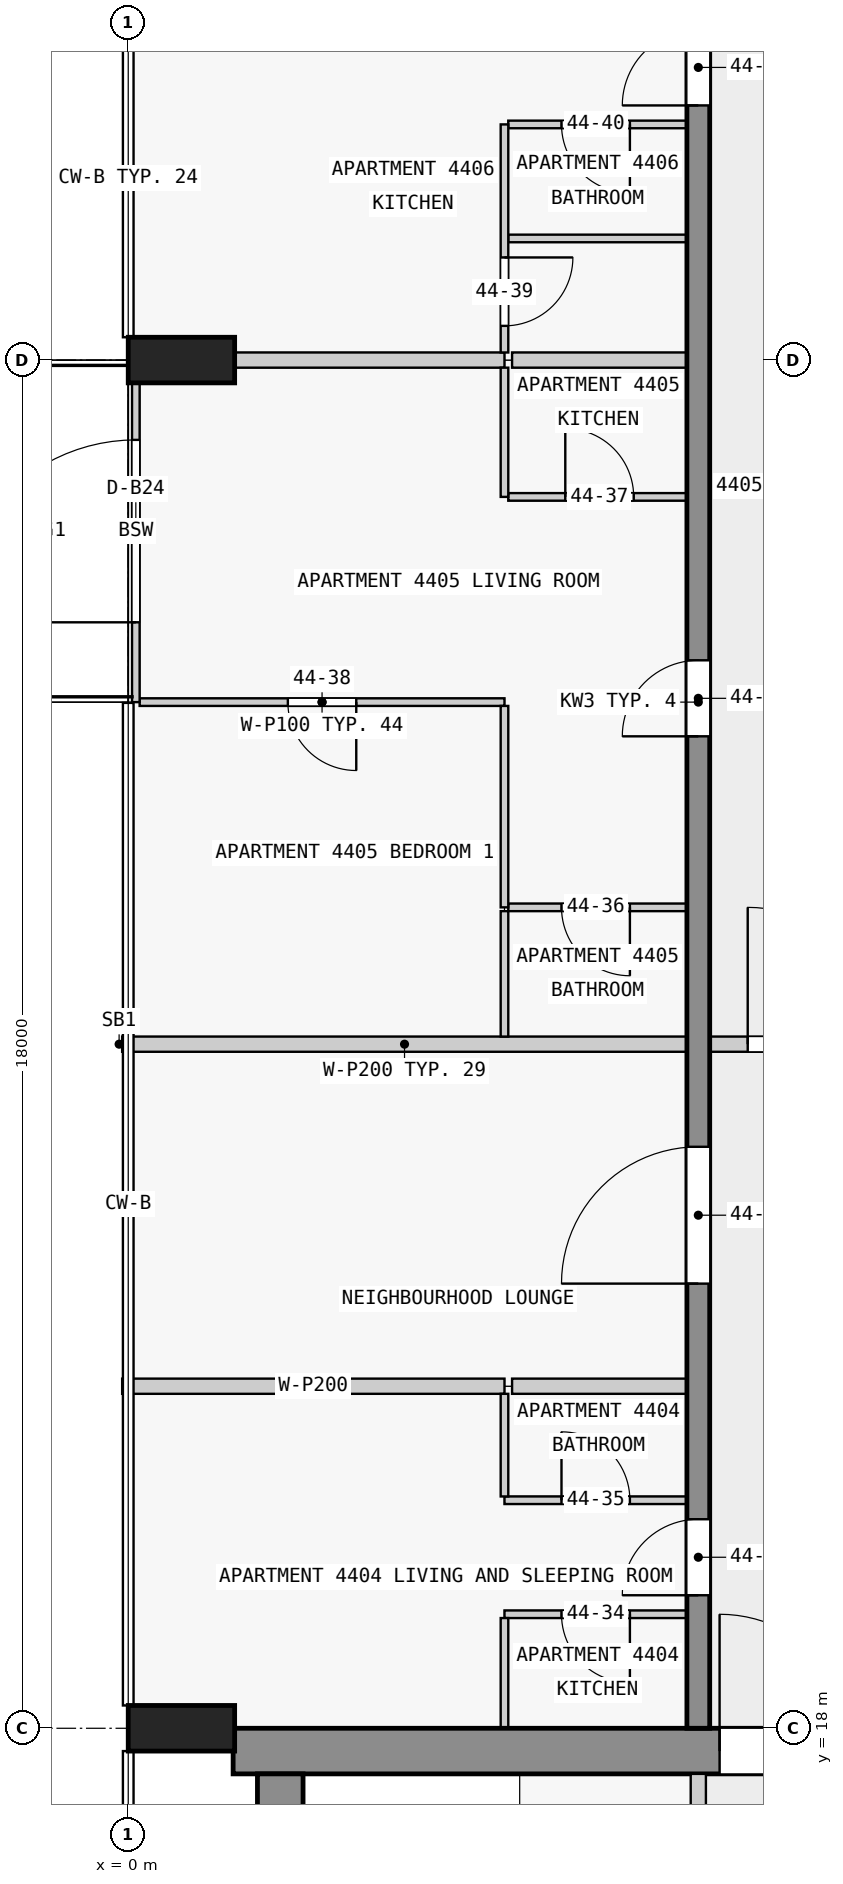
"""IFC4 building model, lengths in metres.
Left out: names, types, materials, properties, quantities, classifications, styles, units other than length and angle.
Written with IfcOpenShell. Run it as: python <this file> out.ifc"""

import sys

from ifc_helpers import new_model, si_unit, direction, frame, frame_2d, origin, origin_2d, place, context, subcontext, project, spatial, rectangle, extrude, element, fill, save


model = new_model("IFC4")
c1 = context("Model", 3, precision=1e-05, world=origin(), true_north=direction((0.0, 1.0)))
c2 = subcontext(c1, "Body", "Model", "MODEL_VIEW")
j1 = project(units=[si_unit("LENGTHUNIT", "METRE"), si_unit("PLANEANGLEUNIT", "RADIAN")], contexts=[c1])
p1 = place(None, origin())
s1 = spatial("IfcSite", under=j1, at=p1, CompositionType="ELEMENT")
p2 = place(p1, origin())
s2 = spatial("IfcBuilding", under=s1, at=p2, CompositionType="ELEMENT")
p3 = place(p2, frame((0.0, 0.0, 170.9)))
s3 = spatial("IfcBuildingStorey", under=s2, at=p3, CompositionType="ELEMENT", Elevation=170.9)
for number, where, z_axis, x_axis in (
    (1, (0.7, 36.0, 0.0), (0.0, 0.0, 1.0), (0.0, 1.0, 0.0)),
    (2, (0.7, 18.0, 0.0), (0.0, 0.0, 1.0), (0.0, 1.0, 0.0)),
):
    element("IfcColumn", number, at=place(p3, frame(where, z_axis=z_axis, x_axis=x_axis)), inside=s3, PredefinedType="COLUMN", context=c2, shape_type="SweptSolid", body=[
        extrude(rectangle(XDim=0.6, YDim=1.4, at=origin_2d()), origin(), (0.0, 0.0, 1.0), 3.5),
    ])
p4 = place(p3, frame((1.38, 17.7, 0.0), z_axis=(0.0, 0.0, 1.0), x_axis=(1.0, 0.0, 0.0)))
e3 = element("IfcWall", 3, at=p4, inside=s3, PredefinedType="SHEAR", context=c2, shape_type="SweptSolid", body=[
    extrude(rectangle(XDim=21.12, YDim=0.6, at=frame_2d((10.56, 0.0))), origin(), (0.0, 0.0, 1.0), 3.25),
])
p5 = place(p4, frame((6.4, 0.0, 0.0)))
e4 = element("IfcOpeningElement", 4, at=p5, cuts=e3, PredefinedType="OPENING", context=c2, shape_type="SweptSolid", body=[
    extrude(rectangle(XDim=1.8, YDim=2.1, at=frame_2d((0.9, 1.05))), frame((0.0, 0.31, 0.0), z_axis=(0.0, -1.0, 0.0), x_axis=(1.0, 0.0, 0.0)), (0.0, 0.0, 1.0), 0.62),
])
p6 = place(p3, frame((2.0, 2.5, 0.0), z_axis=(0.0, 0.0, 1.0), x_axis=(0.0, 1.0, 0.0)))
e5 = element("IfcWall", 5, at=p6, inside=s3, PredefinedType="SHEAR", context=c2, shape_type="SweptSolid", body=[
    extrude(rectangle(XDim=14.9, YDim=0.6, at=frame_2d((7.45, 0.0))), origin(), (0.0, 0.0, 1.0), 3.25),
])
p7 = place(p3, frame((7.5, 18.0, 0.0), z_axis=(0.0, 0.0, 1.0), x_axis=(0.0, 1.0, 0.0)))
e6 = element("IfcWall", 6, at=p7, inside=s3, PredefinedType="SHEAR", context=c2, shape_type="SweptSolid", body=[
    extrude(rectangle(XDim=27.0, YDim=0.3, at=frame_2d((13.5, 0.0))), origin(), (0.0, 0.0, 1.0), 3.25),
])
p8 = place(p7, frame((1.75, 0.0, 0.0)))
e7 = element("IfcOpeningElement", 7, at=p8, cuts=e6, PredefinedType="OPENING", context=c2, shape_type="SweptSolid", body=[
    extrude(rectangle(XDim=1.0, YDim=2.1, at=frame_2d((0.5, 1.05))), frame((0.0, 0.16, 0.0), z_axis=(0.0, -1.0, 0.0), x_axis=(1.0, 0.0, 0.0)), (0.0, 0.0, 1.0), 0.32),
])
p9 = place(p7, frame((5.85, 0.0, 0.0)))
e8 = element("IfcOpeningElement", 8, at=p9, cuts=e6, PredefinedType="OPENING", context=c2, shape_type="SweptSolid", body=[
    extrude(rectangle(XDim=1.8, YDim=2.1, at=frame_2d((0.9, 1.05))), frame((0.0, 0.16, 0.0), z_axis=(0.0, -1.0, 0.0), x_axis=(1.0, 0.0, 0.0)), (0.0, 0.0, 1.0), 0.32),
])
p10 = place(p7, frame((13.05, 0.0, 0.0)))
e9 = element("IfcOpeningElement", 9, at=p10, cuts=e6, PredefinedType="OPENING", context=c2, shape_type="SweptSolid", body=[
    extrude(rectangle(XDim=1.0, YDim=2.1, at=frame_2d((0.5, 1.05))), frame((0.0, 0.16, 0.0), z_axis=(0.0, -1.0, 0.0), x_axis=(1.0, 0.0, 0.0)), (0.0, 0.0, 1.0), 0.32),
])
p11 = place(p7, frame((21.35, 0.0, 0.0)))
e10 = element("IfcOpeningElement", 10, at=p11, cuts=e6, PredefinedType="OPENING", context=c2, shape_type="SweptSolid", body=[
    extrude(rectangle(XDim=1.0, YDim=2.1, at=frame_2d((0.5, 1.05))), frame((0.0, 0.16, 0.0), z_axis=(0.0, -1.0, 0.0), x_axis=(1.0, 0.0, 0.0)), (0.0, 0.0, 1.0), 0.32),
])
p12 = place(p3, frame((0.1, 31.5, 0.0), z_axis=(0.0, 0.0, 1.0), x_axis=(0.0, 1.0, 0.0)))
e11 = element("IfcWall", 11, at=p12, inside=s3, PredefinedType="STANDARD", context=c2, shape_type="SweptSolid", body=[
    extrude(rectangle(XDim=4.5, YDim=0.1, at=frame_2d((2.25, 0.0))), origin(), (0.0, 0.0, 1.0), 3.25),
])
p13 = place(p12, frame((1.05, 0.0, 0.0)))
e12 = element("IfcOpeningElement", 12, at=p13, cuts=e11, PredefinedType="OPENING", context=c2, shape_type="SweptSolid", body=[
    extrude(rectangle(XDim=2.4, YDim=2.4, at=frame_2d((1.2, 1.2))), frame((0.0, 0.06, 0.0), z_axis=(0.0, -1.0, 0.0), x_axis=(1.0, 0.0, 0.0)), (0.0, 0.0, 1.0), 0.12),
])
p14 = place(p3, frame((7.5, 10.1, 0.0), z_axis=(0.0, 0.0, 1.0), x_axis=(0.0, 1.0, 0.0)))
e13 = element("IfcWall", 13, at=p14, inside=s3, PredefinedType="PARTITIONING", context=c2, shape_type="SweptSolid", body=[
    extrude(rectangle(XDim=7.3, YDim=0.2, at=frame_2d((3.65, 0.0))), origin(), (0.0, 0.0, 1.0), 3.25),
])
p15 = place(p14, frame((0.775, 0.0, 0.0)))
e14 = element("IfcOpeningElement", 14, at=p15, cuts=e13, PredefinedType="OPENING", context=c2, shape_type="SweptSolid", body=[
    extrude(rectangle(XDim=0.9, YDim=2.1, at=frame_2d((0.45, 1.05))), frame((0.0, 0.11, 0.0), z_axis=(0.0, -1.0, 0.0), x_axis=(1.0, 0.0, 0.0)), (0.0, 0.0, 1.0), 0.22),
])
p16 = place(p14, frame((3.225, 0.0, 0.0)))
e15 = element("IfcOpeningElement", 15, at=p16, cuts=e13, PredefinedType="OPENING", context=c2, shape_type="SweptSolid", body=[
    extrude(rectangle(XDim=0.9, YDim=2.1, at=frame_2d((0.45, 1.05))), frame((0.0, 0.11, 0.0), z_axis=(0.0, -1.0, 0.0), x_axis=(1.0, 0.0, 0.0)), (0.0, 0.0, 1.0), 0.22),
])
p17 = place(p14, frame((5.25, 0.0, 0.0)))
e16 = element("IfcOpeningElement", 16, at=p17, cuts=e13, PredefinedType="OPENING", context=c2, shape_type="SweptSolid", body=[
    extrude(rectangle(XDim=0.9, YDim=2.1, at=frame_2d((0.45, 1.05))), frame((0.0, 0.11, 0.0), z_axis=(0.0, -1.0, 0.0), x_axis=(1.0, 0.0, 0.0)), (0.0, 0.0, 1.0), 0.22),
])
p18 = place(p3, frame((7.35, 19.5, 0.0), z_axis=(0.0, 0.0, 1.0), x_axis=(-1.0, 0.0, 0.0)))
e17 = element("IfcWall", 17, at=p18, inside=s3, PredefinedType="PARTITIONING", context=c2, shape_type="SweptSolid", body=[
    extrude(rectangle(XDim=2.4, YDim=0.1, at=frame_2d((1.2, 0.0))), origin(), (0.0, 0.0, 1.0), 3.25),
])
p19 = place(p18, frame((0.75, 0.0, 0.0)))
e18 = element("IfcOpeningElement", 18, at=p19, cuts=e17, PredefinedType="OPENING", context=c2, shape_type="SweptSolid", body=[
    extrude(rectangle(XDim=0.9, YDim=2.1, at=frame_2d((0.45, 1.05))), frame((0.0, 0.06, 0.0), z_axis=(0.0, -1.0, 0.0), x_axis=(1.0, 0.0, 0.0)), (0.0, 0.0, 1.0), 0.12),
])
p20 = place(p3, frame((4.95, 21.0, 0.0), z_axis=(0.0, 0.0, 1.0), x_axis=(1.0, 0.0, 0.0)))
e19 = element("IfcWall", 19, at=p20, inside=s3, PredefinedType="PARTITIONING", context=c2, shape_type="SweptSolid", body=[
    extrude(rectangle(XDim=2.4, YDim=0.1, at=frame_2d((1.2, 0.0))), origin(), (0.0, 0.0, 1.0), 3.25),
])
p21 = place(p20, frame((0.75, 0.0, 0.0)))
e20 = element("IfcOpeningElement", 20, at=p21, cuts=e19, PredefinedType="OPENING", context=c2, shape_type="SweptSolid", body=[
    extrude(rectangle(XDim=0.9, YDim=2.1, at=frame_2d((0.45, 1.05))), frame((0.0, 0.06, 0.0), z_axis=(0.0, -1.0, 0.0), x_axis=(1.0, 0.0, 0.0)), (0.0, 0.0, 1.0), 0.12),
])
p22 = place(p3, frame((7.35, 22.5, 0.0), z_axis=(0.0, 0.0, 1.0), x_axis=(-1.0, 0.0, 0.0)))
e21 = element("IfcWall", 21, at=p22, inside=s3, PredefinedType="PARTITIONING", context=c2, shape_type="SweptSolid", body=[
    extrude(rectangle(XDim=2.3, YDim=0.2, at=frame_2d((1.15, 0.0))), origin(), (0.0, 0.0, 1.0), 3.25),
])
p23 = place(p3, frame((-0.08, 22.5, 0.0), z_axis=(0.0, 0.0, 1.0), x_axis=(1.0, 0.0, 0.0)))
e22 = element("IfcWall", 22, at=p23, inside=s3, PredefinedType="PARTITIONING", context=c2, shape_type="SweptSolid", body=[
    extrude(rectangle(XDim=5.03, YDim=0.2, at=frame_2d((2.515, 0.0))), origin(), (0.0, 0.0, 1.0), 3.25),
])
p24 = place(p3, frame((7.35, 27.0, 0.0), z_axis=(0.0, 0.0, 1.0), x_axis=(-1.0, 0.0, 0.0)))
e23 = element("IfcWall", 23, at=p24, inside=s3, PredefinedType="PARTITIONING", context=c2, shape_type="SweptSolid", body=[
    extrude(rectangle(XDim=7.43, YDim=0.2, at=frame_2d((3.715, 0.0))), origin(), (0.0, 0.0, 1.0), 3.25),
])
p25 = place(p3, frame((7.35, 28.8, 0.0), z_axis=(0.0, 0.0, 1.0), x_axis=(-1.0, 0.0, 0.0)))
e24 = element("IfcWall", 24, at=p25, inside=s3, PredefinedType="PARTITIONING", context=c2, shape_type="SweptSolid", body=[
    extrude(rectangle(XDim=2.35, YDim=0.1, at=frame_2d((1.175, 0.0))), origin(), (0.0, 0.0, 1.0), 3.25),
])
p26 = place(p25, frame((0.75, 0.0, 0.0)))
e25 = element("IfcOpeningElement", 25, at=p26, cuts=e24, PredefinedType="OPENING", context=c2, shape_type="SweptSolid", body=[
    extrude(rectangle(XDim=0.9, YDim=2.1, at=frame_2d((0.45, 1.05))), frame((0.0, 0.06, 0.0), z_axis=(0.0, -1.0, 0.0), x_axis=(1.0, 0.0, 0.0)), (0.0, 0.0, 1.0), 0.12),
])
p27 = place(p3, frame((4.95, 31.5, 0.0), z_axis=(0.0, 0.0, 1.0), x_axis=(-1.0, 0.0, 0.0)))
e26 = element("IfcWall", 26, at=p27, inside=s3, PredefinedType="PARTITIONING", context=c2, shape_type="SweptSolid", body=[
    extrude(rectangle(XDim=4.8, YDim=0.1, at=frame_2d((2.4, 0.0))), origin(), (0.0, 0.0, 1.0), 3.25),
])
p28 = place(p27, frame((1.95, 0.0, 0.0)))
e27 = element("IfcOpeningElement", 27, at=p28, cuts=e26, PredefinedType="OPENING", context=c2, shape_type="SweptSolid", body=[
    extrude(rectangle(XDim=0.9, YDim=2.1, at=frame_2d((0.45, 1.05))), frame((0.0, 0.06, 0.0), z_axis=(0.0, -1.0, 0.0), x_axis=(1.0, 0.0, 0.0)), (0.0, 0.0, 1.0), 0.12),
])
p29 = place(p3, frame((5.0, 34.2, 0.0), z_axis=(0.0, 0.0, 1.0), x_axis=(1.0, 0.0, 0.0)))
e28 = element("IfcWall", 28, at=p29, inside=s3, PredefinedType="PARTITIONING", context=c2, shape_type="SweptSolid", body=[
    extrude(rectangle(XDim=2.35, YDim=0.1, at=frame_2d((1.175, 0.0))), origin(), (0.0, 0.0, 1.0), 3.25),
])
p30 = place(p29, frame((0.75, 0.0, 0.0)))
e29 = element("IfcOpeningElement", 29, at=p30, cuts=e28, PredefinedType="OPENING", context=c2, shape_type="SweptSolid", body=[
    extrude(rectangle(XDim=0.9, YDim=2.1, at=frame_2d((0.45, 1.05))), frame((0.0, 0.06, 0.0), z_axis=(0.0, -1.0, 0.0), x_axis=(1.0, 0.0, 0.0)), (0.0, 0.0, 1.0), 0.12),
])
p31 = place(p3, frame((7.35, 36.0, 0.0), z_axis=(0.0, 0.0, 1.0), x_axis=(-1.0, 0.0, 0.0)))
e30 = element("IfcWall", 30, at=p31, inside=s3, PredefinedType="PARTITIONING", context=c2, shape_type="SweptSolid", body=[
    extrude(rectangle(XDim=2.3, YDim=0.2, at=frame_2d((1.15, 0.0))), origin(), (0.0, 0.0, 1.0), 3.25),
])
p32 = place(p3, frame((1.4, 36.0, 0.0), z_axis=(0.0, 0.0, 1.0), x_axis=(1.0, 0.0, 0.0)))
e31 = element("IfcWall", 31, at=p32, inside=s3, PredefinedType="PARTITIONING", context=c2, shape_type="SweptSolid", body=[
    extrude(rectangle(XDim=3.55, YDim=0.2, at=frame_2d((1.775, 0.0))), origin(), (0.0, 0.0, 1.0), 3.25),
])
p33 = place(p3, frame((7.35, 37.6, 0.0), z_axis=(0.0, 0.0, 1.0), x_axis=(-1.0, 0.0, 0.0)))
e32 = element("IfcWall", 32, at=p33, inside=s3, PredefinedType="PARTITIONING", context=c2, shape_type="SweptSolid", body=[
    extrude(rectangle(XDim=2.35, YDim=0.1, at=frame_2d((1.175, 0.0))), origin(), (0.0, 0.0, 1.0), 3.25),
])
p34 = place(p3, frame((7.35, 39.1, 0.0), z_axis=(0.0, 0.0, 1.0), x_axis=(-1.0, 0.0, 0.0)))
e33 = element("IfcWall", 33, at=p34, inside=s3, PredefinedType="PARTITIONING", context=c2, shape_type="SweptSolid", body=[
    extrude(rectangle(XDim=2.35, YDim=0.1, at=frame_2d((1.175, 0.0))), origin(), (0.0, 0.0, 1.0), 3.25),
])
p35 = place(p34, frame((0.75, 0.0, 0.0)))
e34 = element("IfcOpeningElement", 34, at=p35, cuts=e33, PredefinedType="OPENING", context=c2, shape_type="SweptSolid", body=[
    extrude(rectangle(XDim=0.9, YDim=2.1, at=frame_2d((0.45, 1.05))), frame((0.0, 0.06, 0.0), z_axis=(0.0, -1.0, 0.0), x_axis=(1.0, 0.0, 0.0)), (0.0, 0.0, 1.0), 0.12),
])
p36 = place(p3, frame((4.95, 19.45, 0.0), z_axis=(0.0, 0.0, 1.0), x_axis=(0.0, -1.0, 0.0)))
e35 = element("IfcWall", 35, at=p36, inside=s3, PredefinedType="PARTITIONING", context=c2, shape_type="SweptSolid", body=[
    extrude(rectangle(XDim=1.45, YDim=0.1, at=frame_2d((0.725, 0.0))), origin(), (0.0, 0.0, 1.0), 3.25),
])
p37 = place(p3, frame((4.95, 22.4, 0.0), z_axis=(0.0, 0.0, 1.0), x_axis=(0.0, -1.0, 0.0)))
e36 = element("IfcWall", 36, at=p37, inside=s3, PredefinedType="PARTITIONING", context=c2, shape_type="SweptSolid", body=[
    extrude(rectangle(XDim=1.35, YDim=0.1, at=frame_2d((0.675, 0.0))), origin(), (0.0, 0.0, 1.0), 3.25),
])
p38 = place(p3, frame((4.95, 28.75, 0.0), z_axis=(0.0, 0.0, 1.0), x_axis=(0.0, -1.0, 0.0)))
e37 = element("IfcWall", 37, at=p38, inside=s3, PredefinedType="PARTITIONING", context=c2, shape_type="SweptSolid", body=[
    extrude(rectangle(XDim=1.65, YDim=0.1, at=frame_2d((0.825, 0.0))), origin(), (0.0, 0.0, 1.0), 3.25),
])
p39 = place(p3, frame((4.95, 35.9, 0.0), z_axis=(0.0, 0.0, 1.0), x_axis=(0.0, -1.0, 0.0)))
e38 = element("IfcWall", 38, at=p39, inside=s3, PredefinedType="PARTITIONING", context=c2, shape_type="SweptSolid", body=[
    extrude(rectangle(XDim=1.7, YDim=0.1, at=frame_2d((0.85, 0.0))), origin(), (0.0, 0.0, 1.0), 3.25),
])
p40 = place(p3, frame((4.95, 39.1, 0.0), z_axis=(0.0, 0.0, 1.0), x_axis=(0.0, -1.0, 0.0)))
e39 = element("IfcWall", 39, at=p40, inside=s3, PredefinedType="PARTITIONING", context=c2, shape_type="SweptSolid", body=[
    extrude(rectangle(XDim=3.0, YDim=0.1, at=frame_2d((1.5, 0.0))), origin(), (0.0, 0.0, 1.0), 3.25),
])
p41 = place(p40, frame((1.75, 0.0, 0.0)))
e40 = element("IfcOpeningElement", 40, at=p41, cuts=e39, PredefinedType="OPENING", context=c2, shape_type="SweptSolid", body=[
    extrude(rectangle(XDim=0.9, YDim=2.1, at=frame_2d((0.45, 1.05))), frame((0.0, 0.06, 0.0), z_axis=(0.0, -1.0, 0.0), x_axis=(1.0, 0.0, 0.0)), (0.0, 0.0, 1.0), 0.12),
])
p42 = place(p3, frame((4.95, 28.8, 0.0), z_axis=(0.0, 0.0, 1.0), x_axis=(0.0, 1.0, 0.0)))
e41 = element("IfcWall", 41, at=p42, inside=s3, PredefinedType="PARTITIONING", context=c2, shape_type="SweptSolid", body=[
    extrude(rectangle(XDim=2.65, YDim=0.1, at=frame_2d((1.325, 0.0))), origin(), (0.0, 0.0, 1.0), 3.25),
])
p43 = place(p3, frame((7.45, 27.0, 0.0), z_axis=(0.0, 0.0, 1.0), x_axis=(1.0, 0.0, 0.0)))
e42 = element("IfcWall", 42, at=p43, inside=s3, PredefinedType="PARTITIONING", context=c2, shape_type="SweptSolid", body=[
    extrude(rectangle(XDim=3.2, YDim=0.2, at=frame_2d((1.6, 0.0))), origin(), (0.0, 0.0, 1.0), 3.25),
])
p44 = place(p43, frame((0.7, 0.0, 0.0)))
e43 = element("IfcOpeningElement", 43, at=p44, cuts=e42, PredefinedType="OPENING", context=c2, shape_type="SweptSolid", body=[
    extrude(rectangle(XDim=1.8, YDim=2.1, at=frame_2d((0.9, 1.05))), frame((0.0, 0.11, 0.0), z_axis=(0.0, -1.0, 0.0), x_axis=(1.0, 0.0, 0.0)), (0.0, 0.0, 1.0), 0.22),
])
p45 = place(p13, origin())
e44 = element("IfcDoor", 44, at=p45, inside=s3, OperationType="SINGLE_SWING_LEFT", PredefinedType="DOOR", context=c2, shape_type="SweptSolid", body=[
    extrude(rectangle(XDim=2.4, YDim=2.4, at=frame_2d((1.2, 1.2))), frame((0.0, 0.025, 0.0), z_axis=(0.0, -1.0, 0.0), x_axis=(1.0, 0.0, 0.0)), (0.0, 0.0, 1.0), 0.05),
])
fill(e12, e44)
p46 = place(p5, origin())
e45 = element("IfcDoor", 45, at=p46, inside=s3, OperationType="DOUBLE_DOOR_SINGLE_SWING", PredefinedType="DOOR", context=c2, shape_type="SweptSolid", body=[
    extrude(rectangle(XDim=1.8, YDim=2.1, at=frame_2d((0.9, 1.05))), frame((0.0, 0.025, 0.0), z_axis=(0.0, -1.0, 0.0), x_axis=(1.0, 0.0, 0.0)), (0.0, 0.0, 1.0), 0.05),
])
fill(e4, e45)
p47 = place(p8, origin())
e46 = element("IfcDoor", 46, at=p47, inside=s3, OperationType="SINGLE_SWING_LEFT", PredefinedType="DOOR", context=c2, shape_type="SweptSolid", body=[
    extrude(rectangle(XDim=1.0, YDim=2.1, at=frame_2d((0.5, 1.05))), frame((0.0, 0.025, 0.0), z_axis=(0.0, -1.0, 0.0), x_axis=(1.0, 0.0, 0.0)), (0.0, 0.0, 1.0), 0.05),
])
fill(e7, e46)
p48 = place(p9, origin())
e47 = element("IfcDoor", 47, at=p48, inside=s3, OperationType="SINGLE_SWING_LEFT", PredefinedType="DOOR", context=c2, shape_type="SweptSolid", body=[
    extrude(rectangle(XDim=1.8, YDim=2.1, at=frame_2d((0.9, 1.05))), frame((0.0, 0.025, 0.0), z_axis=(0.0, -1.0, 0.0), x_axis=(1.0, 0.0, 0.0)), (0.0, 0.0, 1.0), 0.05),
])
fill(e8, e47)
p49 = place(p10, origin())
e48 = element("IfcDoor", 48, at=p49, inside=s3, OperationType="SINGLE_SWING_RIGHT", PredefinedType="DOOR", context=c2, shape_type="SweptSolid", body=[
    extrude(rectangle(XDim=1.0, YDim=2.1, at=frame_2d((0.5, 1.05))), frame((0.0, 0.025, 0.0), z_axis=(0.0, -1.0, 0.0), x_axis=(1.0, 0.0, 0.0)), (0.0, 0.0, 1.0), 0.05),
])
fill(e9, e48)
p50 = place(p11, origin())
e49 = element("IfcDoor", 49, at=p50, inside=s3, OperationType="SINGLE_SWING_RIGHT", PredefinedType="DOOR", context=c2, shape_type="SweptSolid", body=[
    extrude(rectangle(XDim=1.0, YDim=2.1, at=frame_2d((0.5, 1.05))), frame((0.0, 0.025, 0.0), z_axis=(0.0, -1.0, 0.0), x_axis=(1.0, 0.0, 0.0)), (0.0, 0.0, 1.0), 0.05),
])
fill(e10, e49)
p51 = place(p44, origin())
e50 = element("IfcDoor", 50, at=p51, inside=s3, OperationType="SINGLE_SWING_LEFT", PredefinedType="DOOR", context=c2, shape_type="SweptSolid", body=[
    extrude(rectangle(XDim=1.8, YDim=2.1, at=frame_2d((0.9, 1.05))), frame((0.0, 0.025, 0.0), z_axis=(0.0, -1.0, 0.0), x_axis=(1.0, 0.0, 0.0)), (0.0, 0.0, 1.0), 0.05),
])
fill(e43, e50)
p52 = place(p19, origin())
e51 = element("IfcDoor", 51, at=p52, inside=s3, OperationType="SINGLE_SWING_RIGHT", PredefinedType="DOOR", context=c2, shape_type="SweptSolid", body=[
    extrude(rectangle(XDim=0.9, YDim=2.1, at=frame_2d((0.45, 1.05))), frame((0.0, 0.025, 0.0), z_axis=(0.0, -1.0, 0.0), x_axis=(1.0, 0.0, 0.0)), (0.0, 0.0, 1.0), 0.05),
])
fill(e18, e51)
p53 = place(p21, origin())
e52 = element("IfcDoor", 52, at=p53, inside=s3, OperationType="SINGLE_SWING_RIGHT", PredefinedType="DOOR", context=c2, shape_type="SweptSolid", body=[
    extrude(rectangle(XDim=0.9, YDim=2.1, at=frame_2d((0.45, 1.05))), frame((0.0, 0.025, 0.0), z_axis=(0.0, -1.0, 0.0), x_axis=(1.0, 0.0, 0.0)), (0.0, 0.0, 1.0), 0.05),
])
fill(e20, e52)
p54 = place(p26, origin())
e53 = element("IfcDoor", 53, at=p54, inside=s3, OperationType="SINGLE_SWING_RIGHT", PredefinedType="DOOR", context=c2, shape_type="SweptSolid", body=[
    extrude(rectangle(XDim=0.9, YDim=2.1, at=frame_2d((0.45, 1.05))), frame((0.0, 0.025, 0.0), z_axis=(0.0, -1.0, 0.0), x_axis=(1.0, 0.0, 0.0)), (0.0, 0.0, 1.0), 0.05),
])
fill(e25, e53)
p55 = place(p30, origin())
e54 = element("IfcDoor", 54, at=p55, inside=s3, OperationType="SINGLE_SWING_RIGHT", PredefinedType="DOOR", context=c2, shape_type="SweptSolid", body=[
    extrude(rectangle(XDim=0.9, YDim=2.1, at=frame_2d((0.45, 1.05))), frame((0.0, 0.025, 0.0), z_axis=(0.0, -1.0, 0.0), x_axis=(1.0, 0.0, 0.0)), (0.0, 0.0, 1.0), 0.05),
])
fill(e29, e54)
p56 = place(p28, origin())
e55 = element("IfcDoor", 55, at=p56, inside=s3, OperationType="SINGLE_SWING_LEFT", PredefinedType="DOOR", context=c2, shape_type="SweptSolid", body=[
    extrude(rectangle(XDim=0.9, YDim=2.1, at=frame_2d((0.45, 1.05))), frame((0.0, 0.025, 0.0), z_axis=(0.0, -1.0, 0.0), x_axis=(1.0, 0.0, 0.0)), (0.0, 0.0, 1.0), 0.05),
])
fill(e27, e55)
p57 = place(p41, origin())
e56 = element("IfcDoor", 56, at=p57, inside=s3, OperationType="SINGLE_SWING_RIGHT", PredefinedType="DOOR", context=c2, shape_type="SweptSolid", body=[
    extrude(rectangle(XDim=0.9, YDim=2.1, at=frame_2d((0.45, 1.05))), frame((0.0, 0.025, 0.0), z_axis=(0.0, -1.0, 0.0), x_axis=(1.0, 0.0, 0.0)), (0.0, 0.0, 1.0), 0.05),
])
fill(e40, e56)
p58 = place(p35, origin())
e57 = element("IfcDoor", 57, at=p58, inside=s3, OperationType="SINGLE_SWING_RIGHT", PredefinedType="DOOR", context=c2, shape_type="SweptSolid", body=[
    extrude(rectangle(XDim=0.9, YDim=2.1, at=frame_2d((0.45, 1.05))), frame((0.0, 0.025, 0.0), z_axis=(0.0, -1.0, 0.0), x_axis=(1.0, 0.0, 0.0)), (0.0, 0.0, 1.0), 0.05),
])
fill(e34, e57)
save(model, sys.argv[1])
